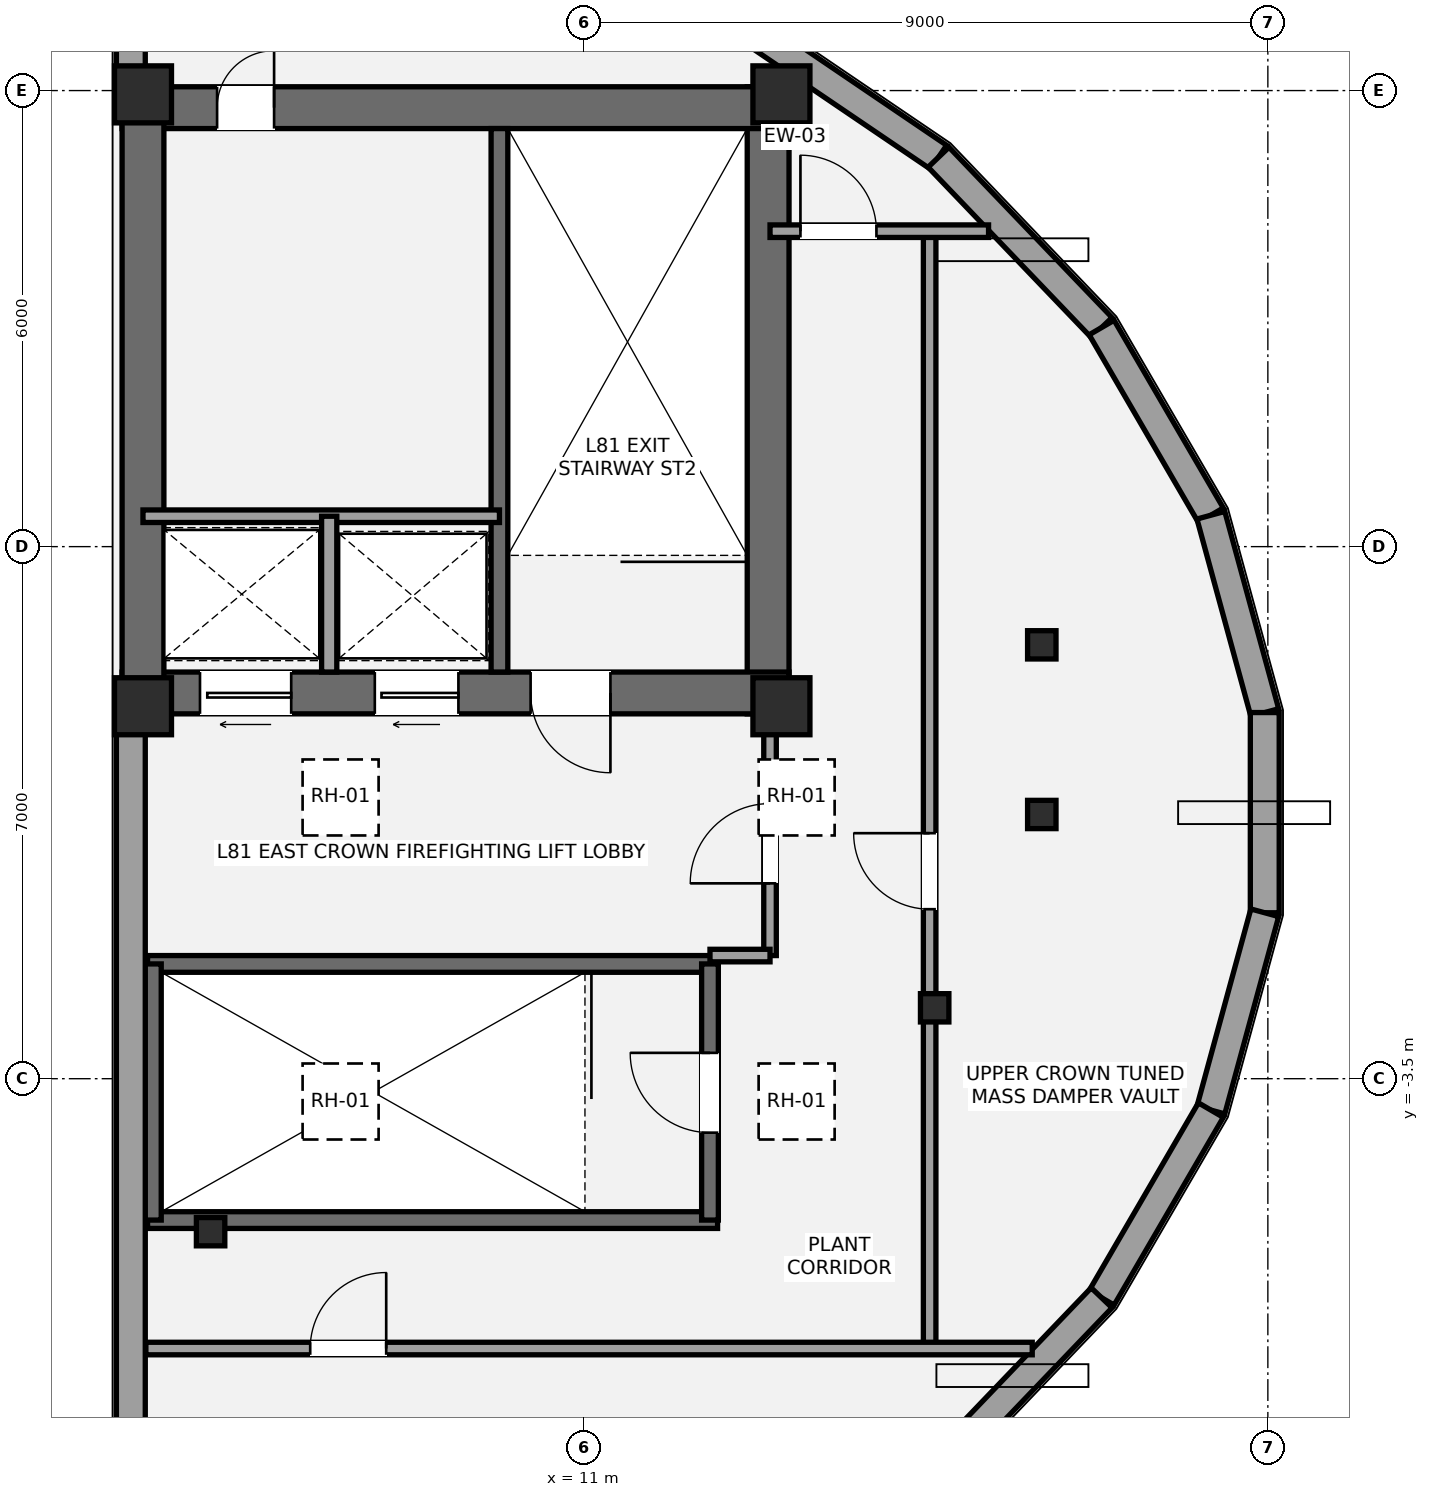
"""IFC4 building model, lengths in metres.
Left out: names, types, materials, properties, quantities, classifications, styles, units other than length and angle.
Written with IfcOpenShell. Run it as: python <this file> out.ifc"""

import sys

from ifc_helpers import new_model, si_unit, direction, frame, frame_2d, origin, origin_2d, place, context, subcontext, project, spatial, rectangle, i_section, extrude, element, fill, save


model = new_model("IFC4")
c1 = context("Model", 3, precision=1e-05, world=origin(), true_north=direction((0.0, 1.0)))
c2 = subcontext(c1, "Body", "Model", "MODEL_VIEW")
j1 = project(units=[si_unit("LENGTHUNIT", "METRE"), si_unit("PLANEANGLEUNIT", "RADIAN")], contexts=[c1])
p1 = place(None, origin())
s1 = spatial("IfcSite", under=j1, at=p1, CompositionType="ELEMENT")
p2 = place(p1, origin())
s2 = spatial("IfcBuilding", under=s1, at=p2, CompositionType="ELEMENT")
p3 = place(p2, frame((0.0, 0.0, 288.2)))
s3 = spatial("IfcBuildingStorey", under=s2, at=p3, CompositionType="ELEMENT", Elevation=288.2)
p4 = place(p3, frame((13.425, 1.3, 0.0), z_axis=(0.0, 0.0, 1.0), x_axis=(0.0, 1.0, 0.0)))
e1 = element("IfcWall", 1, at=p4, inside=s3, PredefinedType="SHEAR", context=c2, shape_type="SweptSolid", body=[
    extrude(rectangle(XDim=8.25, YDim=0.55, at=frame_2d((4.125, 0.0))), origin(), (0.0, 0.0, 1.0), 3.8),
])
p5 = place(p3, frame((4.925, 9.275, 0.0), z_axis=(0.0, 0.0, 1.0), x_axis=(1.0, 0.0, 0.0)))
e2 = element("IfcWall", 2, at=p5, inside=s3, PredefinedType="SHEAR", context=c2, shape_type="SweptSolid", body=[
    extrude(rectangle(XDim=8.775, YDim=0.55, at=frame_2d((4.387, 0.0))), origin(), (0.0, 0.0, 1.0), 3.8),
])
p6 = place(p5, frame((1.25, 0.0, 0.0)))
e3 = element("IfcOpeningElement", 3, at=p6, cuts=e2, PredefinedType="OPENING", context=c2, shape_type="SweptSolid", body=[
    extrude(rectangle(XDim=0.75, YDim=2.1, at=frame_2d((0.375, 1.05))), frame((0.0, 0.285, 0.0), z_axis=(0.0, -1.0, 0.0), x_axis=(1.0, 0.0, 0.0)), (0.0, 0.0, 1.0), 0.57),
])
p7 = place(p3, frame((13.7, 1.575, 0.0), z_axis=(0.0, 0.0, 1.0), x_axis=(-1.0, 0.0, 0.0)))
e4 = element("IfcWall", 4, at=p7, inside=s3, PredefinedType="SHEAR", context=c2, shape_type="SweptSolid", body=[
    extrude(rectangle(XDim=8.775, YDim=0.55, at=frame_2d((4.387, 0.0))), origin(), (0.0, 0.0, 1.0), 3.8),
])
p8 = place(p7, frame((2.35, 0.0, 0.0)))
e5 = element("IfcOpeningElement", 5, at=p8, cuts=e4, PredefinedType="OPENING", context=c2, shape_type="SweptSolid", body=[
    extrude(rectangle(XDim=1.05, YDim=2.15, at=frame_2d((0.525, 1.075))), frame((0.0, 0.285, 0.0), z_axis=(0.0, -1.0, 0.0), x_axis=(1.0, 0.0, 0.0)), (0.0, 0.0, 1.0), 0.57),
])
p9 = place(p7, frame((6.55, 0.0, 0.0)))
e6 = element("IfcOpeningElement", 6, at=p9, cuts=e4, PredefinedType="OPENING", context=c2, shape_type="SweptSolid", body=[
    extrude(rectangle(XDim=1.2, YDim=2.2, at=frame_2d((0.6, 1.1))), frame((0.0, 0.285, 0.0), z_axis=(0.0, -1.0, 0.0), x_axis=(1.0, 0.0, 0.0)), (0.0, 0.0, 1.0), 0.57),
])
p10 = place(p7, frame((4.35, 0.0, 0.0)))
e7 = element("IfcOpeningElement", 7, at=p10, cuts=e4, PredefinedType="OPENING", context=c2, shape_type="SweptSolid", body=[
    extrude(rectangle(XDim=1.1, YDim=2.2, at=frame_2d((0.55, 1.1))), frame((0.0, 0.285, 0.0), z_axis=(0.0, -1.0, 0.0), x_axis=(1.0, 0.0, 0.0)), (0.0, 0.0, 1.0), 0.57),
])
p11 = place(p3, frame((5.2, 1.3, 0.0), z_axis=(0.0, 0.0, 1.0), x_axis=(0.0, 1.0, 0.0)))
e8 = element("IfcWall", 8, at=p11, inside=s3, PredefinedType="SHEAR", context=c2, shape_type="SweptSolid", body=[
    extrude(rectangle(XDim=8.25, YDim=0.55, at=frame_2d((4.125, 0.0))), origin(), (0.0, 0.0, 1.0), 3.8),
])
p12 = place(p3, frame((9.89, 1.85, 0.0), z_axis=(0.0, 0.0, 1.0), x_axis=(0.0, 1.0, 0.0)))
e9 = element("IfcWall", 9, at=p12, inside=s3, PredefinedType="SHEAR", context=c2, shape_type="SweptSolid", body=[
    extrude(rectangle(XDim=7.15, YDim=0.22, at=frame_2d((3.575, 0.0))), origin(), (0.0, 0.0, 1.0), 3.8),
])
for number, where, z_axis, x_axis in (
    (10, (5.26, -1.99, 0.0), (0.0, 0.0, 1.0), (1.0, 0.0, 0.0)),
    (11, (5.26, -5.36, 0.0), (0.0, 0.0, 1.0), (1.0, 0.0, 0.0)),
):
    element("IfcWall", number, at=place(p3, frame(where, z_axis=z_axis, x_axis=x_axis)), inside=s3, PredefinedType="SHEAR", context=c2, shape_type="SweptSolid", body=[
        extrude(rectangle(XDim=7.5, YDim=0.22, at=frame_2d((3.75, 0.0))), origin(), (0.0, 0.0, 1.0), 3.8),
    ])
p13 = place(p3, frame((5.33, -5.36, 0.0), z_axis=(0.0, 0.0, 1.0), x_axis=(0.0, 1.0, 0.0)))
e12 = element("IfcWall", 12, at=p13, inside=s3, PredefinedType="SHEAR", context=c2, shape_type="SweptSolid", body=[
    extrude(rectangle(XDim=3.37, YDim=0.22, at=frame_2d((1.685, 0.0))), origin(), (0.0, 0.0, 1.0), 3.8),
])
p14 = place(p3, frame((12.66, -5.36, 0.0), z_axis=(0.0, 0.0, 1.0), x_axis=(0.0, 1.0, 0.0)))
e13 = element("IfcWall", 13, at=p14, inside=s3, PredefinedType="SHEAR", context=c2, shape_type="SweptSolid", body=[
    extrude(rectangle(XDim=3.37, YDim=0.22, at=frame_2d((1.685, 0.0))), origin(), (0.0, 0.0, 1.0), 3.8),
])
p15 = place(p14, frame((1.15, 0.0, 0.0)))
e14 = element("IfcOpeningElement", 14, at=p15, cuts=e13, PredefinedType="OPENING", context=c2, shape_type="SweptSolid", body=[
    extrude(rectangle(XDim=1.05, YDim=2.15, at=frame_2d((0.525, 1.075))), frame((0.0, 0.12, 0.0), z_axis=(0.0, -1.0, 0.0), x_axis=(1.0, 0.0, 0.0)), (0.0, 0.0, 1.0), 0.24),
])
for number, where, z_axis, x_axis in (
    (15, (5.2, 1.4, 0.0), (0.0, 0.0, 1.0), (1.0, 0.0, 0.0)),
    (16, (5.2, 9.45, 0.0), (0.0, 0.0, 1.0), (1.0, 0.0, 0.0)),
    (17, (13.6, 1.4, 0.0), (0.0, 0.0, 1.0), (1.0, 0.0, 0.0)),
    (18, (13.6, 9.45, 0.0), (0.0, 0.0, 1.0), (1.0, 0.0, 0.0)),
):
    element("IfcColumn", number, at=place(p3, frame(where, z_axis=z_axis, x_axis=x_axis)), inside=s3, PredefinedType="PILASTER", context=c2, shape_type="SweptSolid", body=[
        extrude(rectangle(XDim=0.75, YDim=0.75, at=origin_2d()), origin(), (0.0, 0.0, 1.0), 3.8),
    ])
for number, where, z_axis, x_axis in (
    (19, (17.026, 2.208, 0.0), (0.0, 0.0, 1.0), (1.0, 0.0, 0.0)),
    (20, (6.09, -5.513, 0.0), (0.0, 0.0, 1.0), (1.0, 0.0, 0.0)),
    (21, (15.616, -2.567, 0.0), (0.0, 0.0, 1.0), (1.0, 0.0, 0.0)),
    (22, (17.026, -0.024, 0.0), (0.0, 0.0, 1.0), (1.0, 0.0, 0.0)),
):
    element("IfcColumn", number, at=place(p3, frame(where, z_axis=z_axis, x_axis=x_axis)), inside=s3, PredefinedType="COLUMN", context=c2, shape_type="SweptSolid", body=[
        extrude(i_section(OverallWidth=0.374, OverallDepth=0.372, WebThickness=0.016, FlangeThickness=0.026, at=origin_2d()), origin(), (0.0, 0.0, 1.0), 3.8),
    ])
p16 = place(p3, frame((15.667, 8.623, 0.0), z_axis=(0.0, 0.0, 1.0), x_axis=(-0.827602756671, 0.561314241001, 0.0)))
e23 = element("IfcWall", 23, at=p16, inside=s3, PredefinedType="ELEMENTEDWALL", context=c2, shape_type="SweptSolid", body=[
    extrude(rectangle(XDim=3.381, YDim=0.38, at=frame_2d((1.691, 0.0))), origin(), (0.0, 0.0, 1.0), 3.02),
])
p17 = place(p3, frame((17.813, 6.382, 0.0), z_axis=(0.0, 0.0, 1.0), x_axis=(-0.691554901652, 0.722323901031, 0.0)))
e24 = element("IfcWall", 24, at=p17, inside=s3, PredefinedType="ELEMENTEDWALL", context=c2, shape_type="SweptSolid", body=[
    extrude(rectangle(XDim=3.103, YDim=0.38, at=frame_2d((1.551, 0.0))), origin(), (0.0, 0.0, 1.0), 3.02),
])
p18 = place(p3, frame((19.25, 3.913, 0.0), z_axis=(0.0, 0.0, 1.0), x_axis=(-0.503052590922, 0.864255801697, 0.0)))
e25 = element("IfcWall", 25, at=p18, inside=s3, PredefinedType="ELEMENTEDWALL", context=c2, shape_type="SweptSolid", body=[
    extrude(rectangle(XDim=2.857, YDim=0.38, at=frame_2d((1.429, 0.0))), origin(), (0.0, 0.0, 1.0), 3.02),
])
p19 = place(p3, frame((19.959, 1.317, 0.0), z_axis=(0.0, 0.0, 1.0), x_axis=(-0.263462838451, 0.964669545884, 0.0)))
e26 = element("IfcWall", 26, at=p19, inside=s3, PredefinedType="ELEMENTEDWALL", context=c2, shape_type="SweptSolid", body=[
    extrude(rectangle(XDim=2.691, YDim=0.38, at=frame_2d((1.345, 0.0))), origin(), (0.0, 0.0, 1.0), 3.02),
])
p20 = place(p3, frame((19.959, -1.317, 0.0), z_axis=(0.0, 0.0, 1.0), x_axis=(0.0, 1.0, 0.0)))
e27 = element("IfcWall", 27, at=p20, inside=s3, PredefinedType="ELEMENTEDWALL", context=c2, shape_type="SweptSolid", body=[
    extrude(rectangle(XDim=2.634, YDim=0.38, at=frame_2d((1.317, 0.0))), origin(), (0.0, 0.0, 1.0), 3.02),
])
p21 = place(p3, frame((19.25, -3.913, 0.0), z_axis=(0.0, 0.0, 1.0), x_axis=(0.263462838451, 0.964669545884, 0.0)))
e28 = element("IfcWall", 28, at=p21, inside=s3, PredefinedType="ELEMENTEDWALL", context=c2, shape_type="SweptSolid", body=[
    extrude(rectangle(XDim=2.691, YDim=0.38, at=frame_2d((1.345, 0.0))), origin(), (0.0, 0.0, 1.0), 3.02),
])
p22 = place(p3, frame((17.813, -6.382, 0.0), z_axis=(0.0, 0.0, 1.0), x_axis=(0.503052590922, 0.864255801697, 0.0)))
e29 = element("IfcWall", 29, at=p22, inside=s3, PredefinedType="ELEMENTEDWALL", context=c2, shape_type="SweptSolid", body=[
    extrude(rectangle(XDim=2.857, YDim=0.38, at=frame_2d((1.429, 0.0))), origin(), (0.0, 0.0, 1.0), 3.02),
])
p23 = place(p3, frame((15.667, -8.623, 0.0), z_axis=(0.0, 0.0, 1.0), x_axis=(0.691554901652, 0.722323901031, 0.0)))
e30 = element("IfcWall", 30, at=p23, inside=s3, PredefinedType="ELEMENTEDWALL", context=c2, shape_type="SweptSolid", body=[
    extrude(rectangle(XDim=3.103, YDim=0.38, at=frame_2d((1.551, 0.0))), origin(), (0.0, 0.0, 1.0), 3.02),
])
p24 = place(p3, frame((5.04, 13.075, 0.0), z_axis=(0.0, 0.0, 1.0), x_axis=(0.0, -1.0, 0.0)))
e31 = element("IfcWall", 31, at=p24, inside=s3, PredefinedType="ELEMENTEDWALL", context=c2, shape_type="SweptSolid", body=[
    extrude(rectangle(XDim=3.445, YDim=0.38, at=frame_2d((1.723, 0.0))), origin(), (0.0, 0.0, 1.0), 3.02),
])
p25 = place(p3, frame((5.04, 1.22, 0.0), z_axis=(0.0, 0.0, 1.0), x_axis=(0.0, -1.0, 0.0)))
e32 = element("IfcWall", 32, at=p25, inside=s3, PredefinedType="ELEMENTEDWALL", context=c2, shape_type="SweptSolid", body=[
    extrude(rectangle(XDim=14.295, YDim=0.38, at=frame_2d((7.147, 0.0))), origin(), (0.0, 0.0, 1.0), 3.02),
])
p26 = place(p3, frame((5.2, 3.9, 0.0), z_axis=(0.0, 0.0, 1.0), x_axis=(1.0, 0.0, 0.0)))
e33 = element("IfcWall", 33, at=p26, inside=s3, PredefinedType="PARTITIONING", context=c2, shape_type="SweptSolid", body=[
    extrude(rectangle(XDim=4.69, YDim=0.165, at=frame_2d((2.345, 0.0))), origin(), (0.0, 0.0, 1.0), 3.65),
])
p27 = place(p3, frame((7.65, 1.85, 0.0), z_axis=(0.0, 0.0, 1.0), x_axis=(0.0, 1.0, 0.0)))
e34 = element("IfcWall", 34, at=p27, inside=s3, PredefinedType="SOLIDWALL", context=c2, shape_type="SweptSolid", body=[
    extrude(rectangle(XDim=2.05, YDim=0.2, at=frame_2d((1.025, 0.0))), origin(), (0.0, 0.0, 1.0), 3.65),
])
p28 = place(p3, frame((13.45, -1.88, 0.0), z_axis=(0.0, 0.0, 1.0), x_axis=(0.0, 1.0, 0.0)))
e35 = element("IfcWall", 35, at=p28, inside=s3, PredefinedType="PARTITIONING", context=c2, shape_type="SweptSolid", body=[
    extrude(rectangle(XDim=3.23, YDim=0.165, at=frame_2d((1.615, 0.0))), origin(), (0.0, 0.0, 1.0), 3.111),
])
p29 = place(p28, frame((0.95, 0.0, 0.0)))
e36 = element("IfcOpeningElement", 36, at=p29, cuts=e35, PredefinedType="OPENING", context=c2, shape_type="SweptSolid", body=[
    extrude(rectangle(XDim=1.05, YDim=2.15, at=frame_2d((0.525, 1.075))), frame((0.0, 0.093, 0.0), z_axis=(0.0, -1.0, 0.0), x_axis=(1.0, 0.0, 0.0)), (0.0, 0.0, 1.0), 0.185),
])
p30 = place(p3, frame((12.66, -1.88, 0.0), z_axis=(0.0, 0.0, 1.0), x_axis=(1.0, 0.0, 0.0)))
e37 = element("IfcWall", 37, at=p30, inside=s3, PredefinedType="PARTITIONING", context=c2, shape_type="SweptSolid", body=[
    extrude(rectangle(XDim=0.79, YDim=0.165, at=frame_2d((0.395, 0.0))), origin(), (0.0, 0.0, 1.0), 3.111),
])
p31 = place(p3, frame((15.55, -7.05, 0.0), z_axis=(0.0, 0.0, 1.0), x_axis=(0.0, 1.0, 0.0)))
e38 = element("IfcWall", 38, at=p31, inside=s3, PredefinedType="PARTITIONING", context=c2, shape_type="SweptSolid", body=[
    extrude(rectangle(XDim=14.7, YDim=0.165, at=frame_2d((7.35, 0.0))), origin(), (0.0, 0.0, 1.0), 3.037),
])
p32 = place(p31, frame((5.78, 0.0, 0.0)))
e39 = element("IfcOpeningElement", 39, at=p32, cuts=e38, PredefinedType="OPENING", context=c2, shape_type="SweptSolid", body=[
    extrude(rectangle(XDim=1.0, YDim=2.15, at=frame_2d((0.5, 1.075))), frame((0.0, 0.093, 0.0), z_axis=(0.0, -1.0, 0.0), x_axis=(1.0, 0.0, 0.0)), (0.0, 0.0, 1.0), 0.185),
])
p33 = place(p3, frame((5.238, -7.05, 0.0), z_axis=(0.0, 0.0, 1.0), x_axis=(1.0, 0.0, 0.0)))
e40 = element("IfcWall", 40, at=p33, inside=s3, PredefinedType="PARTITIONING", context=c2, shape_type="SweptSolid", body=[
    extrude(rectangle(XDim=11.662, YDim=0.165, at=frame_2d((5.831, 0.0))), origin(), (0.0, 0.0, 1.0), 3.018),
])
p34 = place(p33, frame((2.162, 0.0, 0.0)))
e41 = element("IfcOpeningElement", 41, at=p34, cuts=e40, PredefinedType="OPENING", context=c2, shape_type="SweptSolid", body=[
    extrude(rectangle(XDim=1.0, YDim=2.15, at=frame_2d((0.5, 1.075))), frame((0.0, 0.093, 0.0), z_axis=(0.0, -1.0, 0.0), x_axis=(1.0, 0.0, 0.0)), (0.0, 0.0, 1.0), 0.185),
])
p35 = place(p3, frame((13.45, 7.65, 0.0), z_axis=(0.0, 0.0, 1.0), x_axis=(1.0, 0.0, 0.0)))
e42 = element("IfcWall", 42, at=p35, inside=s3, PredefinedType="PARTITIONING", context=c2, shape_type="SweptSolid", body=[
    extrude(rectangle(XDim=2.875, YDim=0.165, at=frame_2d((1.438, 0.0))), origin(), (0.0, 0.0, 1.0), 3.018),
])
p36 = place(p35, frame((0.4, 0.0, 0.0)))
e43 = element("IfcOpeningElement", 43, at=p36, cuts=e42, PredefinedType="OPENING", context=c2, shape_type="SweptSolid", body=[
    extrude(rectangle(XDim=1.0, YDim=2.15, at=frame_2d((0.5, 1.075))), frame((0.0, 0.093, 0.0), z_axis=(0.0, -1.0, 0.0), x_axis=(1.0, 0.0, 0.0)), (0.0, 0.0, 1.0), 0.185),
])
p37 = place(p2, frame((0.0, 0.0, 292.0)))
p38 = place(p37, frame((0.0, 0.0, -0.15)))
p39 = place(p38, frame((7.8, -3.8, 0.0)))
p40 = place(p39, frame((0.0, 0.0, 0.1)))
e44 = element("IfcDoor", 44, at=p40, inside=s3, OperationType="SINGLE_SWING_LEFT", PredefinedType="TRAPDOOR", context=c2, shape_type="SweptSolid", body=[
    extrude(rectangle(XDim=1.0, YDim=1.0, at=origin_2d()), origin(), (0.0, 0.0, 1.0), 0.05),
])
p41 = place(p38, frame((13.8, -3.8, 0.0)))
p42 = place(p41, frame((0.0, 0.0, 0.1)))
e45 = element("IfcDoor", 45, at=p42, inside=s3, OperationType="SINGLE_SWING_LEFT", PredefinedType="TRAPDOOR", context=c2, shape_type="SweptSolid", body=[
    extrude(rectangle(XDim=1.0, YDim=1.0, at=origin_2d()), origin(), (0.0, 0.0, 1.0), 0.05),
])
p43 = place(p38, frame((7.8, 0.2, 0.0)))
p44 = place(p43, frame((0.0, 0.0, 0.1)))
e46 = element("IfcDoor", 46, at=p44, inside=s3, OperationType="SINGLE_SWING_LEFT", PredefinedType="TRAPDOOR", context=c2, shape_type="SweptSolid", body=[
    extrude(rectangle(XDim=1.0, YDim=1.0, at=origin_2d()), origin(), (0.0, 0.0, 1.0), 0.05),
])
p45 = place(p38, frame((13.8, 0.2, 0.0)))
p46 = place(p45, frame((0.0, 0.0, 0.1)))
e47 = element("IfcDoor", 47, at=p46, inside=s3, OperationType="SINGLE_SWING_LEFT", PredefinedType="TRAPDOOR", context=c2, shape_type="SweptSolid", body=[
    extrude(rectangle(XDim=1.0, YDim=1.0, at=origin_2d()), origin(), (0.0, 0.0, 1.0), 0.05),
])
p47 = place(p29, origin())
e48 = element("IfcDoor", 48, at=p47, inside=s3, OperationType="SINGLE_SWING_LEFT", PredefinedType="DOOR", context=c2, shape_type="SweptSolid", body=[
    extrude(rectangle(XDim=1.05, YDim=2.15, at=frame_2d((0.525, 1.075))), frame((0.0, 0.025, 0.0), z_axis=(0.0, -1.0, 0.0), x_axis=(1.0, 0.0, 0.0)), (0.0, 0.0, 1.0), 0.05),
])
fill(e36, e48)
p48 = place(p8, origin())
e49 = element("IfcDoor", 49, at=p48, inside=s3, OperationType="SINGLE_SWING_LEFT", PredefinedType="DOOR", context=c2, shape_type="SweptSolid", body=[
    extrude(rectangle(XDim=1.05, YDim=2.15, at=frame_2d((0.525, 1.075))), frame((0.0, 0.025, 0.0), z_axis=(0.0, -1.0, 0.0), x_axis=(1.0, 0.0, 0.0)), (0.0, 0.0, 1.0), 0.05),
])
fill(e5, e49)
p49 = place(p15, origin())
e50 = element("IfcDoor", 50, at=p49, inside=s3, OperationType="SINGLE_SWING_RIGHT", PredefinedType="DOOR", context=c2, shape_type="SweptSolid", body=[
    extrude(rectangle(XDim=1.05, YDim=2.15, at=frame_2d((0.525, 1.075))), frame((0.0, 0.025, 0.0), z_axis=(0.0, -1.0, 0.0), x_axis=(1.0, 0.0, 0.0)), (0.0, 0.0, 1.0), 0.05),
])
fill(e14, e50)
p50 = place(p6, origin())
e51 = element("IfcDoor", 51, at=p50, inside=s3, OperationType="SINGLE_SWING_RIGHT", PredefinedType="DOOR", context=c2, shape_type="SweptSolid", body=[
    extrude(rectangle(XDim=0.75, YDim=2.1, at=frame_2d((0.375, 1.05))), frame((0.0, 0.025, 0.0), z_axis=(0.0, -1.0, 0.0), x_axis=(1.0, 0.0, 0.0)), (0.0, 0.0, 1.0), 0.05),
])
fill(e3, e51)
p51 = place(p9, origin())
e52 = element("IfcDoor", 52, at=p51, inside=s3, OperationType="SLIDING_TO_RIGHT", PredefinedType="DOOR", context=c2, shape_type="SweptSolid", body=[
    extrude(rectangle(XDim=1.2, YDim=2.2, at=frame_2d((0.6, 1.1))), frame((0.0, 0.025, 0.0), z_axis=(0.0, -1.0, 0.0), x_axis=(1.0, 0.0, 0.0)), (0.0, 0.0, 1.0), 0.05),
])
fill(e6, e52)
p52 = place(p10, origin())
e53 = element("IfcDoor", 53, at=p52, inside=s3, OperationType="SLIDING_TO_LEFT", PredefinedType="DOOR", context=c2, shape_type="SweptSolid", body=[
    extrude(rectangle(XDim=1.1, YDim=2.2, at=frame_2d((0.55, 1.1))), frame((0.0, 0.025, 0.0), z_axis=(0.0, -1.0, 0.0), x_axis=(1.0, 0.0, 0.0)), (0.0, 0.0, 1.0), 0.05),
])
fill(e7, e53)
p53 = place(p36, origin())
e54 = element("IfcDoor", 54, at=p53, inside=s3, OperationType="SINGLE_SWING_LEFT", PredefinedType="DOOR", context=c2, shape_type="SweptSolid", body=[
    extrude(rectangle(XDim=1.0, YDim=2.15, at=frame_2d((0.5, 1.075))), frame((0.0, 0.025, 0.0), z_axis=(0.0, -1.0, 0.0), x_axis=(1.0, 0.0, 0.0)), (0.0, 0.0, 1.0), 0.05),
])
fill(e43, e54)
p54 = place(p34, origin())
e55 = element("IfcDoor", 55, at=p54, inside=s3, OperationType="SINGLE_SWING_RIGHT", PredefinedType="DOOR", context=c2, shape_type="SweptSolid", body=[
    extrude(rectangle(XDim=1.0, YDim=2.15, at=frame_2d((0.5, 1.075))), frame((0.0, 0.025, 0.0), z_axis=(0.0, -1.0, 0.0), x_axis=(1.0, 0.0, 0.0)), (0.0, 0.0, 1.0), 0.05),
])
fill(e41, e55)
p55 = place(p32, origin())
e56 = element("IfcDoor", 56, at=p55, inside=s3, OperationType="SINGLE_SWING_RIGHT", PredefinedType="DOOR", context=c2, shape_type="SweptSolid", body=[
    extrude(rectangle(XDim=1.0, YDim=2.15, at=frame_2d((0.5, 1.075))), frame((0.0, 0.025, 0.0), z_axis=(0.0, -1.0, 0.0), x_axis=(1.0, 0.0, 0.0)), (0.0, 0.0, 1.0), 0.05),
])
fill(e39, e56)
save(model, sys.argv[1])
